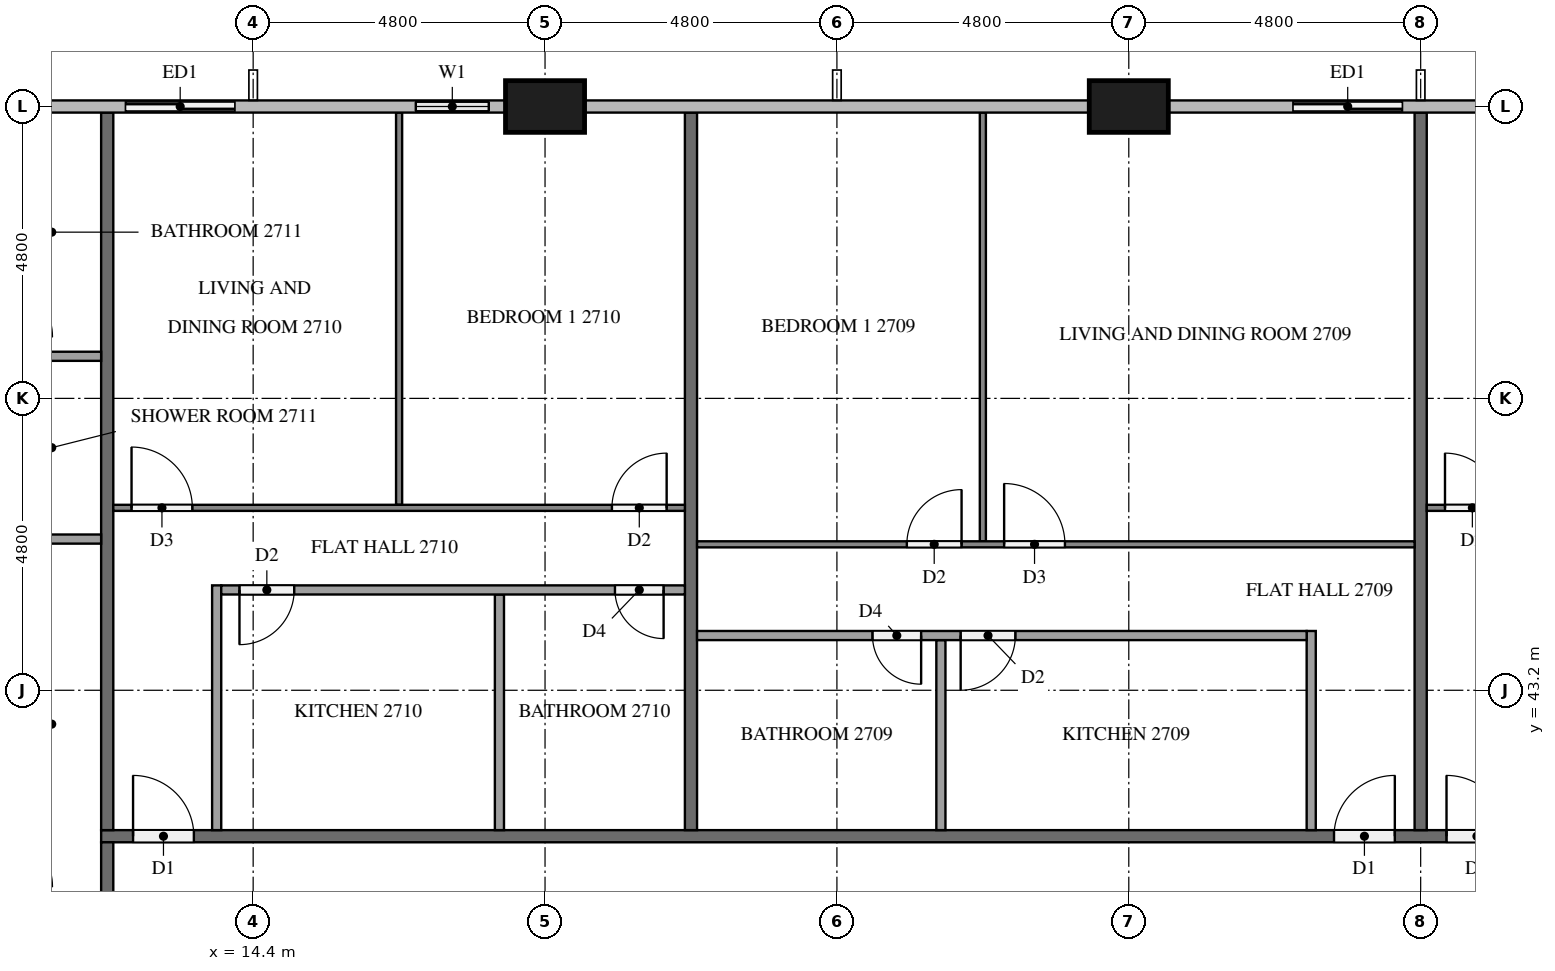
"""IFC4 building model, lengths in metres.
Left out: names, types, materials, properties, quantities, classifications, styles, units other than length and angle.
Written with IfcOpenShell. Run it as: python <this file> out.ifc"""

import sys

from ifc_helpers import new_model, si_unit, direction, frame, frame_2d, origin, origin_2d, place, context, subcontext, project, spatial, rectangle, extrude, element, fill, save


model = new_model("IFC4")
c1 = context("Model", 3, precision=1e-05, world=origin(), true_north=direction((0.0, 1.0)))
c2 = subcontext(c1, "Body", "Model", "MODEL_VIEW")
j1 = project(units=[si_unit("LENGTHUNIT", "METRE"), si_unit("PLANEANGLEUNIT", "RADIAN")], contexts=[c1])
p1 = place(None, origin())
s1 = spatial("IfcSite", under=j1, at=p1, CompositionType="ELEMENT")
p2 = place(p1, origin())
s2 = spatial("IfcBuilding", under=s1, at=p2, CompositionType="ELEMENT")
p3 = place(p2, frame((0.0, 0.0, 106.7)))
s3 = spatial("IfcBuildingStorey", under=s2, at=p3, CompositionType="ELEMENT", Elevation=106.7)
for number, where, z_axis, x_axis in (
    (1, (28.8, 52.8, 0.0), (0.0, 0.0, 1.0), (1.0, 0.0, 0.0)),
    (2, (19.2, 52.8, 0.0), (0.0, 0.0, 1.0), (1.0, 0.0, 0.0)),
):
    element("IfcColumn", number, at=place(p3, frame(where, z_axis=z_axis, x_axis=x_axis)), inside=s3, PredefinedType="COLUMN", context=c2, shape_type="SweptSolid", body=[
        extrude(rectangle(XDim=1.3, YDim=0.85, at=origin_2d()), origin(), (0.0, 0.0, 1.0), 3.2),
    ])
p4 = place(p3, frame((33.6, 52.8, 0.0), z_axis=(0.0, 0.0, 1.0), x_axis=(-1.0, 0.0, 0.0)))
e3 = element("IfcWall", 3, at=p4, inside=s3, PredefinedType="SOLIDWALL", context=c2, shape_type="SweptSolid", body=[
    extrude(rectangle(XDim=2.4, YDim=0.15, at=frame_2d((1.2, 0.0))), origin(), (0.0, 0.0, 1.0), 3.2),
])
p5 = place(p4, frame((0.3, 0.0, 0.0)))
e4 = element("IfcOpeningElement", 4, at=p5, cuts=e3, PredefinedType="OPENING", context=c2, shape_type="SweptSolid", body=[
    extrude(rectangle(XDim=1.8, YDim=2.4, at=frame_2d((0.9, 1.2))), frame((0.0, 0.085, 0.0), z_axis=(0.0, -1.0, 0.0), x_axis=(1.0, 0.0, 0.0)), (0.0, 0.0, 1.0), 0.17),
])
p6 = place(p3, frame((18.55, 52.8, 0.0), z_axis=(0.0, 0.0, 1.0), x_axis=(-1.0, 0.0, 0.0)))
e5 = element("IfcWall", 5, at=p6, inside=s3, PredefinedType="SOLIDWALL", context=c2, shape_type="SweptSolid", body=[
    extrude(rectangle(XDim=1.75, YDim=0.15, at=frame_2d((0.875, 0.0))), origin(), (0.0, 0.0, 1.0), 3.2),
])
p7 = place(p6, frame((0.275, 0.0, 0.9)))
e6 = element("IfcOpeningElement", 6, at=p7, cuts=e5, PredefinedType="OPENING", context=c2, shape_type="SweptSolid", body=[
    extrude(rectangle(XDim=1.2, YDim=1.4, at=frame_2d((0.6, 0.7))), frame((0.0, 0.085, 0.0), z_axis=(0.0, -1.0, 0.0), x_axis=(1.0, 0.0, 0.0)), (0.0, 0.0, 1.0), 0.17),
])
p8 = place(p3, frame((14.4, 52.8, 0.0), z_axis=(0.0, 0.0, 1.0), x_axis=(-1.0, 0.0, 0.0)))
e7 = element("IfcWall", 7, at=p8, inside=s3, PredefinedType="SOLIDWALL", context=c2, shape_type="SweptSolid", body=[
    extrude(rectangle(XDim=2.4, YDim=0.15, at=frame_2d((1.2, 0.0))), origin(), (0.0, 0.0, 1.0), 3.2),
])
p9 = place(p8, frame((0.3, 0.0, 0.0)))
e8 = element("IfcOpeningElement", 8, at=p9, cuts=e7, PredefinedType="OPENING", context=c2, shape_type="SweptSolid", body=[
    extrude(rectangle(XDim=1.8, YDim=2.4, at=frame_2d((0.9, 1.2))), frame((0.0, 0.085, 0.0), z_axis=(0.0, -1.0, 0.0), x_axis=(1.0, 0.0, 0.0)), (0.0, 0.0, 1.0), 0.17),
])
p10 = place(p3, frame((11.9, 40.8, 0.0), z_axis=(0.0, 0.0, 1.0), x_axis=(1.0, 0.0, 0.0)))
e9 = element("IfcWall", 9, at=p10, inside=s3, PredefinedType="PARTITIONING", context=c2, shape_type="SweptSolid", body=[
    extrude(rectangle(XDim=38.6, YDim=0.2, at=frame_2d((19.3, 0.0))), origin(), (0.0, 0.0, 1.0), 3.2),
])
p11 = place(p10, frame((22.125, 0.0, 0.0)))
e10 = element("IfcOpeningElement", 10, at=p11, cuts=e9, PredefinedType="OPENING", context=c2, shape_type="SweptSolid", body=[
    extrude(rectangle(XDim=1.0, YDim=2.1, at=frame_2d((0.5, 1.05))), frame((0.0, 0.11, 0.0), z_axis=(0.0, -1.0, 0.0), x_axis=(1.0, 0.0, 0.0)), (0.0, 0.0, 1.0), 0.22),
])
p12 = place(p10, frame((20.275, 0.0, 0.0)))
e11 = element("IfcOpeningElement", 11, at=p12, cuts=e9, PredefinedType="OPENING", context=c2, shape_type="SweptSolid", body=[
    extrude(rectangle(XDim=1.0, YDim=2.1, at=frame_2d((0.5, 1.05))), frame((0.0, 0.11, 0.0), z_axis=(0.0, -1.0, 0.0), x_axis=(1.0, 0.0, 0.0)), (0.0, 0.0, 1.0), 0.22),
])
p13 = place(p10, frame((0.525, 0.0, 0.0)))
e12 = element("IfcOpeningElement", 12, at=p13, cuts=e9, PredefinedType="OPENING", context=c2, shape_type="SweptSolid", body=[
    extrude(rectangle(XDim=1.0, YDim=2.1, at=frame_2d((0.5, 1.05))), frame((0.0, 0.11, 0.0), z_axis=(0.0, -1.0, 0.0), x_axis=(1.0, 0.0, 0.0)), (0.0, 0.0, 1.0), 0.22),
])
p14 = place(p3, frame((12.0, 37.9, 0.0), z_axis=(0.0, 0.0, 1.0), x_axis=(0.0, 1.0, 0.0)))
e13 = element("IfcWall", 13, at=p14, inside=s3, PredefinedType="PARTITIONING", context=c2, shape_type="SweptSolid", body=[
    extrude(rectangle(XDim=2.8, YDim=0.2, at=frame_2d((1.4, 0.0))), origin(), (0.0, 0.0, 1.0), 3.2),
])
p15 = place(p14, frame((0.325, 0.0, 0.0)))
e14 = element("IfcOpeningElement", 14, at=p15, cuts=e13, PredefinedType="OPENING", context=c2, shape_type="SweptSolid", body=[
    extrude(rectangle(XDim=1.0, YDim=2.1, at=frame_2d((0.5, 1.05))), frame((0.0, 0.11, 0.0), z_axis=(0.0, -1.0, 0.0), x_axis=(1.0, 0.0, 0.0)), (0.0, 0.0, 1.0), 0.22),
])
for number, where, z_axis, x_axis in (
    (15, (33.6, 52.7, 0.0), (0.0, 0.0, 1.0), (0.0, -1.0, 0.0)),
    (16, (21.6, 52.7, 0.0), (0.0, 0.0, 1.0), (0.0, -1.0, 0.0)),
    (17, (12.0, 52.7, 0.0), (0.0, 0.0, 1.0), (0.0, -1.0, 0.0)),
):
    element("IfcWall", number, at=place(p3, frame(where, z_axis=z_axis, x_axis=x_axis)), inside=s3, PredefinedType="PARTITIONING", context=c2, shape_type="SweptSolid", body=[
        extrude(rectangle(XDim=11.8, YDim=0.2, at=frame_2d((5.9, 0.0))), origin(), (0.0, 0.0, 1.0), 3.2),
    ])
p16 = place(p3, frame((33.7, 46.2, 0.0), z_axis=(0.0, 0.0, 1.0), x_axis=(1.0, 0.0, 0.0)))
e18 = element("IfcWall", 18, at=p16, inside=s3, PredefinedType="PARTITIONING", context=c2, shape_type="SweptSolid", body=[
    extrude(rectangle(XDim=16.6, YDim=0.1, at=frame_2d((8.3, 0.0))), origin(), (0.0, 0.0, 1.0), 3.2),
])
p17 = place(p16, frame((0.3, 0.0, 0.0)))
e19 = element("IfcOpeningElement", 19, at=p17, cuts=e18, PredefinedType="OPENING", context=c2, shape_type="SweptSolid", body=[
    extrude(rectangle(XDim=0.9, YDim=2.1, at=frame_2d((0.45, 1.05))), frame((0.0, 0.06, 0.0), z_axis=(0.0, -1.0, 0.0), x_axis=(1.0, 0.0, 0.0)), (0.0, 0.0, 1.0), 0.12),
])
p18 = place(p16, frame((10.55, 0.0, 0.0)))
e20 = element("IfcOpeningElement", 20, at=p18, cuts=e18, PredefinedType="OPENING", context=c2, shape_type="SweptSolid", body=[
    extrude(rectangle(XDim=1.0, YDim=2.1, at=frame_2d((0.5, 1.05))), frame((0.0, 0.06, 0.0), z_axis=(0.0, -1.0, 0.0), x_axis=(1.0, 0.0, 0.0)), (0.0, 0.0, 1.0), 0.12),
])
p19 = place(p16, frame((12.25, 0.0, 0.0)))
e21 = element("IfcOpeningElement", 21, at=p19, cuts=e18, PredefinedType="OPENING", context=c2, shape_type="SweptSolid", body=[
    extrude(rectangle(XDim=0.9, YDim=2.1, at=frame_2d((0.45, 1.05))), frame((0.0, 0.06, 0.0), z_axis=(0.0, -1.0, 0.0), x_axis=(1.0, 0.0, 0.0)), (0.0, 0.0, 1.0), 0.12),
])
p20 = place(p3, frame((26.4, 45.65, 0.0), z_axis=(0.0, 0.0, 1.0), x_axis=(0.0, 1.0, 0.0)))
e22 = element("IfcWall", 22, at=p20, inside=s3, PredefinedType="PARTITIONING", context=c2, shape_type="SweptSolid", body=[
    extrude(rectangle(XDim=7.05, YDim=0.1, at=frame_2d((3.525, 0.0))), origin(), (0.0, 0.0, 1.0), 3.2),
])
p21 = place(p3, frame((21.7, 45.6, 0.0), z_axis=(0.0, 0.0, 1.0), x_axis=(1.0, 0.0, 0.0)))
e23 = element("IfcWall", 23, at=p21, inside=s3, PredefinedType="PARTITIONING", context=c2, shape_type="SweptSolid", body=[
    extrude(rectangle(XDim=11.8, YDim=0.1, at=frame_2d((5.9, 0.0))), origin(), (0.0, 0.0, 1.0), 3.2),
])
p22 = place(p21, frame((5.05, 0.0, 0.0)))
e24 = element("IfcOpeningElement", 24, at=p22, cuts=e23, PredefinedType="OPENING", context=c2, shape_type="SweptSolid", body=[
    extrude(rectangle(XDim=1.0, YDim=2.1, at=frame_2d((0.5, 1.05))), frame((0.0, 0.06, 0.0), z_axis=(0.0, -1.0, 0.0), x_axis=(1.0, 0.0, 0.0)), (0.0, 0.0, 1.0), 0.12),
])
p23 = place(p21, frame((3.45, 0.0, 0.0)))
e25 = element("IfcOpeningElement", 25, at=p23, cuts=e23, PredefinedType="OPENING", context=c2, shape_type="SweptSolid", body=[
    extrude(rectangle(XDim=0.9, YDim=2.1, at=frame_2d((0.45, 1.05))), frame((0.0, 0.06, 0.0), z_axis=(0.0, -1.0, 0.0), x_axis=(1.0, 0.0, 0.0)), (0.0, 0.0, 1.0), 0.12),
])
p24 = place(p3, frame((25.71, 40.9, 0.0), z_axis=(0.0, 0.0, 1.0), x_axis=(0.0, 1.0, 0.0)))
e26 = element("IfcWall", 26, at=p24, inside=s3, PredefinedType="PARTITIONING", context=c2, shape_type="SweptSolid", body=[
    extrude(rectangle(XDim=3.125, YDim=0.15, at=frame_2d((1.562, 0.0))), origin(), (0.0, 0.0, 1.0), 3.2),
])
p25 = place(p3, frame((31.8, 40.9, 0.0), z_axis=(0.0, 0.0, 1.0), x_axis=(0.0, 1.0, 0.0)))
e27 = element("IfcWall", 27, at=p25, inside=s3, PredefinedType="PARTITIONING", context=c2, shape_type="SweptSolid", body=[
    extrude(rectangle(XDim=3.275, YDim=0.15, at=frame_2d((1.638, 0.0))), origin(), (0.0, 0.0, 1.0), 3.2),
])
p26 = place(p3, frame((31.725, 44.1, 0.0), z_axis=(0.0, 0.0, 1.0), x_axis=(-1.0, 0.0, 0.0)))
e28 = element("IfcWall", 28, at=p26, inside=s3, PredefinedType="PARTITIONING", context=c2, shape_type="SweptSolid", body=[
    extrude(rectangle(XDim=10.025, YDim=0.15, at=frame_2d((5.013, 0.0))), origin(), (0.0, 0.0, 1.0), 3.2),
])
p27 = place(p26, frame((4.79, 0.0, 0.0)))
e29 = element("IfcOpeningElement", 29, at=p27, cuts=e28, PredefinedType="OPENING", context=c2, shape_type="SweptSolid", body=[
    extrude(rectangle(XDim=0.9, YDim=2.1, at=frame_2d((0.45, 1.05))), frame((0.0, 0.085, 0.0), z_axis=(0.0, -1.0, 0.0), x_axis=(1.0, 0.0, 0.0)), (0.0, 0.0, 1.0), 0.17),
])
p28 = place(p26, frame((6.34, 0.0, 0.0)))
e30 = element("IfcOpeningElement", 30, at=p28, cuts=e28, PredefinedType="OPENING", context=c2, shape_type="SweptSolid", body=[
    extrude(rectangle(XDim=0.8, YDim=2.1, at=frame_2d((0.4, 1.05))), frame((0.0, 0.085, 0.0), z_axis=(0.0, -1.0, 0.0), x_axis=(1.0, 0.0, 0.0)), (0.0, 0.0, 1.0), 0.17),
])
p29 = place(p3, frame((16.8, 46.25, 0.0), z_axis=(0.0, 0.0, 1.0), x_axis=(0.0, 1.0, 0.0)))
e31 = element("IfcWall", 31, at=p29, inside=s3, PredefinedType="PARTITIONING", context=c2, shape_type="SweptSolid", body=[
    extrude(rectangle(XDim=6.45, YDim=0.1, at=frame_2d((3.225, 0.0))), origin(), (0.0, 0.0, 1.0), 3.2),
])
p30 = place(p3, frame((12.1, 46.2, 0.0), z_axis=(0.0, 0.0, 1.0), x_axis=(1.0, 0.0, 0.0)))
e32 = element("IfcWall", 32, at=p30, inside=s3, PredefinedType="PARTITIONING", context=c2, shape_type="SweptSolid", body=[
    extrude(rectangle(XDim=9.4, YDim=0.1, at=frame_2d((4.7, 0.0))), origin(), (0.0, 0.0, 1.0), 3.2),
])
p31 = place(p30, frame((0.3, 0.0, 0.0)))
e33 = element("IfcOpeningElement", 33, at=p31, cuts=e32, PredefinedType="OPENING", context=c2, shape_type="SweptSolid", body=[
    extrude(rectangle(XDim=1.0, YDim=2.1, at=frame_2d((0.5, 1.05))), frame((0.0, 0.06, 0.0), z_axis=(0.0, -1.0, 0.0), x_axis=(1.0, 0.0, 0.0)), (0.0, 0.0, 1.0), 0.12),
])
p32 = place(p30, frame((8.2, 0.0, 0.0)))
e34 = element("IfcOpeningElement", 34, at=p32, cuts=e32, PredefinedType="OPENING", context=c2, shape_type="SweptSolid", body=[
    extrude(rectangle(XDim=0.9, YDim=2.1, at=frame_2d((0.45, 1.05))), frame((0.0, 0.06, 0.0), z_axis=(0.0, -1.0, 0.0), x_axis=(1.0, 0.0, 0.0)), (0.0, 0.0, 1.0), 0.12),
])
p33 = place(p3, frame((18.45, 40.9, 0.0), z_axis=(0.0, 0.0, 1.0), x_axis=(0.0, 1.0, 0.0)))
e35 = element("IfcWall", 35, at=p33, inside=s3, PredefinedType="PARTITIONING", context=c2, shape_type="SweptSolid", body=[
    extrude(rectangle(XDim=3.875, YDim=0.15, at=frame_2d((1.938, 0.0))), origin(), (0.0, 0.0, 1.0), 3.2),
])
p34 = place(p3, frame((13.8, 40.9, 0.0), z_axis=(0.0, 0.0, 1.0), x_axis=(0.0, 1.0, 0.0)))
e36 = element("IfcWall", 36, at=p34, inside=s3, PredefinedType="PARTITIONING", context=c2, shape_type="SweptSolid", body=[
    extrude(rectangle(XDim=4.025, YDim=0.15, at=frame_2d((2.013, 0.0))), origin(), (0.0, 0.0, 1.0), 3.2),
])
p35 = place(p3, frame((21.5, 44.85, 0.0), z_axis=(0.0, 0.0, 1.0), x_axis=(-1.0, 0.0, 0.0)))
e37 = element("IfcWall", 37, at=p35, inside=s3, PredefinedType="PARTITIONING", context=c2, shape_type="SweptSolid", body=[
    extrude(rectangle(XDim=7.625, YDim=0.15, at=frame_2d((3.812, 0.0))), origin(), (0.0, 0.0, 1.0), 3.2),
])
p36 = place(p35, frame((6.425, 0.0, 0.0)))
e38 = element("IfcOpeningElement", 38, at=p36, cuts=e37, PredefinedType="OPENING", context=c2, shape_type="SweptSolid", body=[
    extrude(rectangle(XDim=0.9, YDim=2.1, at=frame_2d((0.45, 1.05))), frame((0.0, 0.085, 0.0), z_axis=(0.0, -1.0, 0.0), x_axis=(1.0, 0.0, 0.0)), (0.0, 0.0, 1.0), 0.17),
])
p37 = place(p35, frame((0.35, 0.0, 0.0)))
e39 = element("IfcOpeningElement", 39, at=p37, cuts=e37, PredefinedType="OPENING", context=c2, shape_type="SweptSolid", body=[
    extrude(rectangle(XDim=0.8, YDim=2.1, at=frame_2d((0.4, 1.05))), frame((0.0, 0.085, 0.0), z_axis=(0.0, -1.0, 0.0), x_axis=(1.0, 0.0, 0.0)), (0.0, 0.0, 1.0), 0.17),
])
for number, where, z_axis, x_axis in (
    (40, (11.9, 45.687, 0.0), (0.0, 0.0, 1.0), (-1.0, 0.0, 0.0)),
    (41, (11.9, 48.692, 0.0), (0.0, 0.0, 1.0), (-1.0, 0.0, 0.0)),
):
    element("IfcWall", number, at=place(p3, frame(where, z_axis=z_axis, x_axis=x_axis)), inside=s3, PredefinedType="PARTITIONING", context=c2, shape_type="SweptSolid", body=[
        extrude(rectangle(XDim=1.625, YDim=0.15, at=frame_2d((0.812, 0.0))), origin(), (0.0, 0.0, 1.0), 3.2),
    ])
p38 = place(p5, origin())
e42 = element("IfcDoor", 42, at=p38, inside=s3, OperationType="SLIDING_TO_LEFT", PredefinedType="DOOR", context=c2, shape_type="SweptSolid", body=[
    extrude(rectangle(XDim=1.8, YDim=2.4, at=frame_2d((0.9, 1.2))), frame((0.0, 0.025, 0.0), z_axis=(0.0, -1.0, 0.0), x_axis=(1.0, 0.0, 0.0)), (0.0, 0.0, 1.0), 0.05),
])
fill(e4, e42)
p39 = place(p7, origin())
e43 = element("IfcWindow", 43, at=p39, inside=s3, PartitioningType="SINGLE_PANEL", PredefinedType="WINDOW", context=c2, shape_type="SweptSolid", body=[
    extrude(rectangle(XDim=1.2, YDim=1.4, at=frame_2d((0.6, 0.7))), frame((0.0, 0.03, 0.0), z_axis=(0.0, -1.0, 0.0), x_axis=(1.0, 0.0, 0.0)), (0.0, 0.0, 1.0), 0.06),
])
fill(e6, e43)
p40 = place(p9, origin())
e44 = element("IfcDoor", 44, at=p40, inside=s3, OperationType="SLIDING_TO_RIGHT", PredefinedType="DOOR", context=c2, shape_type="SweptSolid", body=[
    extrude(rectangle(XDim=1.8, YDim=2.4, at=frame_2d((0.9, 1.2))), frame((0.0, 0.025, 0.0), z_axis=(0.0, -1.0, 0.0), x_axis=(1.0, 0.0, 0.0)), (0.0, 0.0, 1.0), 0.05),
])
fill(e8, e44)
p41 = place(p11, origin())
e45 = element("IfcDoor", 45, at=p41, inside=s3, OperationType="SINGLE_SWING_LEFT", PredefinedType="DOOR", context=c2, shape_type="SweptSolid", body=[
    extrude(rectangle(XDim=1.0, YDim=2.1, at=frame_2d((0.5, 1.05))), frame((0.0, 0.025, 0.0), z_axis=(0.0, -1.0, 0.0), x_axis=(1.0, 0.0, 0.0)), (0.0, 0.0, 1.0), 0.05),
])
fill(e10, e45)
p42 = place(p12, origin())
e46 = element("IfcDoor", 46, at=p42, inside=s3, OperationType="SINGLE_SWING_RIGHT", PredefinedType="DOOR", context=c2, shape_type="SweptSolid", body=[
    extrude(rectangle(XDim=1.0, YDim=2.1, at=frame_2d((0.5, 1.05))), frame((0.0, 0.025, 0.0), z_axis=(0.0, -1.0, 0.0), x_axis=(1.0, 0.0, 0.0)), (0.0, 0.0, 1.0), 0.05),
])
fill(e11, e46)
p43 = place(p13, origin())
e47 = element("IfcDoor", 47, at=p43, inside=s3, OperationType="SINGLE_SWING_LEFT", PredefinedType="DOOR", context=c2, shape_type="SweptSolid", body=[
    extrude(rectangle(XDim=1.0, YDim=2.1, at=frame_2d((0.5, 1.05))), frame((0.0, 0.025, 0.0), z_axis=(0.0, -1.0, 0.0), x_axis=(1.0, 0.0, 0.0)), (0.0, 0.0, 1.0), 0.05),
])
fill(e12, e47)
p44 = place(p17, origin())
e48 = element("IfcDoor", 48, at=p44, inside=s3, OperationType="SINGLE_SWING_LEFT", PredefinedType="DOOR", context=c2, shape_type="SweptSolid", body=[
    extrude(rectangle(XDim=0.9, YDim=2.1, at=frame_2d((0.45, 1.05))), frame((0.0, 0.025, 0.0), z_axis=(0.0, -1.0, 0.0), x_axis=(1.0, 0.0, 0.0)), (0.0, 0.0, 1.0), 0.05),
])
fill(e19, e48)
p45 = place(p22, origin())
e49 = element("IfcDoor", 49, at=p45, inside=s3, OperationType="SINGLE_SWING_LEFT", PredefinedType="DOOR", context=c2, shape_type="SweptSolid", body=[
    extrude(rectangle(XDim=1.0, YDim=2.1, at=frame_2d((0.5, 1.05))), frame((0.0, 0.025, 0.0), z_axis=(0.0, -1.0, 0.0), x_axis=(1.0, 0.0, 0.0)), (0.0, 0.0, 1.0), 0.05),
])
fill(e24, e49)
p46 = place(p23, origin())
e50 = element("IfcDoor", 50, at=p46, inside=s3, OperationType="SINGLE_SWING_RIGHT", PredefinedType="DOOR", context=c2, shape_type="SweptSolid", body=[
    extrude(rectangle(XDim=0.9, YDim=2.1, at=frame_2d((0.45, 1.05))), frame((0.0, 0.025, 0.0), z_axis=(0.0, -1.0, 0.0), x_axis=(1.0, 0.0, 0.0)), (0.0, 0.0, 1.0), 0.05),
])
fill(e25, e50)
p47 = place(p27, origin())
e51 = element("IfcDoor", 51, at=p47, inside=s3, OperationType="SINGLE_SWING_RIGHT", PredefinedType="DOOR", context=c2, shape_type="SweptSolid", body=[
    extrude(rectangle(XDim=0.9, YDim=2.1, at=frame_2d((0.45, 1.05))), frame((0.0, 0.025, 0.0), z_axis=(0.0, -1.0, 0.0), x_axis=(1.0, 0.0, 0.0)), (0.0, 0.0, 1.0), 0.05),
])
fill(e29, e51)
p48 = place(p28, origin())
e52 = element("IfcDoor", 52, at=p48, inside=s3, OperationType="SINGLE_SWING_LEFT", PredefinedType="DOOR", context=c2, shape_type="SweptSolid", body=[
    extrude(rectangle(XDim=0.8, YDim=2.1, at=frame_2d((0.4, 1.05))), frame((0.0, 0.025, 0.0), z_axis=(0.0, -1.0, 0.0), x_axis=(1.0, 0.0, 0.0)), (0.0, 0.0, 1.0), 0.05),
])
fill(e30, e52)
p49 = place(p31, origin())
e53 = element("IfcDoor", 53, at=p49, inside=s3, OperationType="SINGLE_SWING_LEFT", PredefinedType="DOOR", context=c2, shape_type="SweptSolid", body=[
    extrude(rectangle(XDim=1.0, YDim=2.1, at=frame_2d((0.5, 1.05))), frame((0.0, 0.025, 0.0), z_axis=(0.0, -1.0, 0.0), x_axis=(1.0, 0.0, 0.0)), (0.0, 0.0, 1.0), 0.05),
])
fill(e33, e53)
p50 = place(p32, origin())
e54 = element("IfcDoor", 54, at=p50, inside=s3, OperationType="SINGLE_SWING_RIGHT", PredefinedType="DOOR", context=c2, shape_type="SweptSolid", body=[
    extrude(rectangle(XDim=0.9, YDim=2.1, at=frame_2d((0.45, 1.05))), frame((0.0, 0.025, 0.0), z_axis=(0.0, -1.0, 0.0), x_axis=(1.0, 0.0, 0.0)), (0.0, 0.0, 1.0), 0.05),
])
fill(e34, e54)
p51 = place(p36, origin())
e55 = element("IfcDoor", 55, at=p51, inside=s3, OperationType="SINGLE_SWING_RIGHT", PredefinedType="DOOR", context=c2, shape_type="SweptSolid", body=[
    extrude(rectangle(XDim=0.9, YDim=2.1, at=frame_2d((0.45, 1.05))), frame((0.0, 0.025, 0.0), z_axis=(0.0, -1.0, 0.0), x_axis=(1.0, 0.0, 0.0)), (0.0, 0.0, 1.0), 0.05),
])
fill(e38, e55)
p52 = place(p37, origin())
e56 = element("IfcDoor", 56, at=p52, inside=s3, OperationType="SINGLE_SWING_LEFT", PredefinedType="DOOR", context=c2, shape_type="SweptSolid", body=[
    extrude(rectangle(XDim=0.8, YDim=2.1, at=frame_2d((0.4, 1.05))), frame((0.0, 0.025, 0.0), z_axis=(0.0, -1.0, 0.0), x_axis=(1.0, 0.0, 0.0)), (0.0, 0.0, 1.0), 0.05),
])
fill(e39, e56)
save(model, sys.argv[1])
